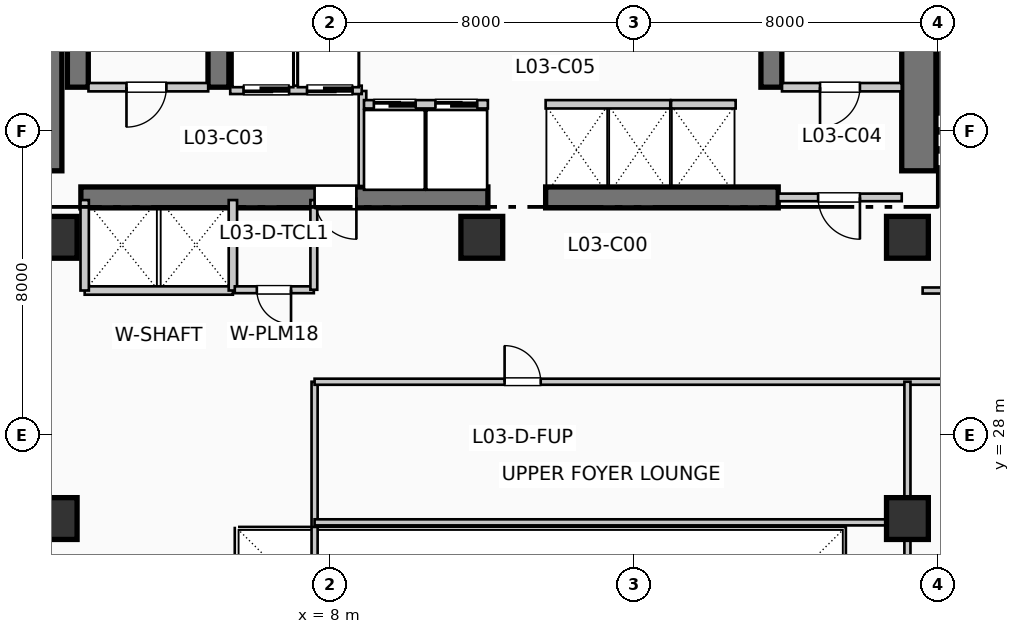
"""IFC4 building model, lengths in metres.
Left out: names, types, materials, properties, quantities, classifications, styles, units other than length and angle.
Written with IfcOpenShell. Run it as: python <this file> out.ifc"""

import sys

from ifc_helpers import new_model, si_unit, direction, frame, frame_2d, origin, origin_2d, place, context, subcontext, project, spatial, rectangle, extrude, element, fill, save


model = new_model("IFC4")
c1 = context("Model", 3, precision=1e-05, world=origin(), true_north=direction((0.0, 1.0)))
c2 = subcontext(c1, "Body", "Model", "MODEL_VIEW")
j1 = project(units=[si_unit("LENGTHUNIT", "METRE"), si_unit("PLANEANGLEUNIT", "RADIAN")], contexts=[c1])
p1 = place(None, origin())
s1 = spatial("IfcSite", under=j1, at=p1, CompositionType="ELEMENT")
p2 = place(p1, origin())
s2 = spatial("IfcBuilding", under=s1, at=p2, CompositionType="ELEMENT")
p3 = place(p2, frame((0.0, 0.0, 16.5)))
s3 = spatial("IfcBuildingStorey", under=s2, at=p3, CompositionType="ELEMENT", Elevation=16.5)
p4 = place(p3, frame((0.5, 34.95, 0.0), z_axis=(0.0, 0.0, 1.0), x_axis=(0.0, 1.0, 0.0)))
e1 = element("IfcWall", 1, at=p4, inside=s3, PredefinedType="SHEAR", context=c2, shape_type="SweptSolid", body=[
    extrude(rectangle(XDim=7.9, YDim=0.9, at=frame_2d((3.95, 0.0))), origin(), (0.0, 0.0, 1.0), 4.62),
])
p5 = place(p3, frame((23.5, 34.95, 0.0), z_axis=(0.0, 0.0, 1.0), x_axis=(0.0, 1.0, 0.0)))
e2 = element("IfcWall", 2, at=p5, inside=s3, PredefinedType="SHEAR", context=c2, shape_type="SweptSolid", body=[
    extrude(rectangle(XDim=10.64, YDim=0.9, at=frame_2d((5.32, 0.0))), origin(), (0.0, 0.0, 1.0), 4.62),
])
p6 = place(p3, frame((1.45, 34.25, 0.0), z_axis=(0.0, 0.0, 1.0), x_axis=(1.0, 0.0, 0.0)))
e3 = element("IfcWall", 3, at=p6, inside=s3, PredefinedType="SHEAR", context=c2, shape_type="SweptSolid", body=[
    extrude(rectangle(XDim=10.71, YDim=0.55, at=frame_2d((5.355, 0.0))), origin(), (0.0, 0.0, 1.0), 4.62),
])
p7 = place(p6, frame((7.25, 0.0, 0.0), z_axis=(0.0, 0.0, 1.0), x_axis=(-1.0, 0.0, 0.0)))
e4 = element("IfcOpeningElement", 4, at=p7, cuts=e3, PredefinedType="OPENING", context=c2, shape_type="SweptSolid", body=[
    extrude(rectangle(XDim=1.1, YDim=2.15, at=frame_2d((0.55, 1.075))), frame((0.0, 0.285, 0.0), z_axis=(0.0, -1.0, 0.0), x_axis=(1.0, 0.0, 0.0)), (0.0, 0.0, 1.0), 0.57),
])
p8 = place(p3, frame((13.68, 34.25, 0.0), z_axis=(0.0, 0.0, 1.0), x_axis=(1.0, 0.0, 0.0)))
e5 = element("IfcWall", 5, at=p8, inside=s3, PredefinedType="SHEAR", context=c2, shape_type="SweptSolid", body=[
    extrude(rectangle(XDim=6.12, YDim=0.55, at=frame_2d((3.06, 0.0))), origin(), (0.0, 0.0, 1.0), 4.62),
])
for number, where, z_axis, x_axis in (
    (6, (1.37, 37.15, 0.0), (0.0, 0.0, 1.0), (0.0, 1.0, 0.0)),
    (7, (5.07, 37.15, 0.0), (0.0, 0.0, 1.0), (0.0, 1.0, 0.0)),
    (8, (19.62, 37.15, 0.0), (0.0, 0.0, 1.0), (0.0, 1.0, 0.0)),
):
    element("IfcWall", number, at=place(p3, frame(where, z_axis=z_axis, x_axis=x_axis)), inside=s3, PredefinedType="SHEAR", context=c2, shape_type="SweptSolid", body=[
        extrude(rectangle(XDim=7.89, YDim=0.55, at=frame_2d((3.945, 0.0))), origin(), (0.0, 0.0, 1.0), 4.62),
    ])
for number, where, z_axis, x_axis in (
    (9, (0.8, 25.8, 0.0), (0.0, 0.0, 1.0), (1.0, 0.0, 0.0)),
    (10, (0.8, 33.2, 0.0), (0.0, 0.0, 1.0), (1.0, 0.0, 0.0)),
    (11, (12.0, 33.2, 0.0), (0.0, 0.0, 1.0), (1.0, 0.0, 0.0)),
    (12, (23.2, 25.8, 0.0), (0.0, 0.0, 1.0), (1.0, 0.0, 0.0)),
    (13, (23.2, 33.2, 0.0), (0.0, 0.0, 1.0), (1.0, 0.0, 0.0)),
):
    element("IfcColumn", number, at=place(p3, frame(where, z_axis=z_axis, x_axis=x_axis)), inside=s3, PredefinedType="COLUMN", context=c2, shape_type="SweptSolid", body=[
        extrude(rectangle(XDim=1.1, YDim=1.1, at=origin_2d()), origin(), (0.0, 0.0, 1.0), 4.62),
    ])
p9 = place(p3, frame((1.65, 37.15, 0.0), z_axis=(0.0, 0.0, 1.0), x_axis=(1.0, 0.0, 0.0)))
e14 = element("IfcWall", 14, at=p9, inside=s3, PredefinedType="PARTITIONING", context=c2, shape_type="SweptSolid", body=[
    extrude(rectangle(XDim=3.15, YDim=0.22, at=frame_2d((1.575, 0.0))), origin(), (0.0, 0.0, 1.0), 4.3),
])
p10 = place(p9, frame((2.05, 0.0, 0.0), z_axis=(0.0, 0.0, 1.0), x_axis=(-1.0, 0.0, 0.0)))
e15 = element("IfcOpeningElement", 15, at=p10, cuts=e14, PredefinedType="OPENING", context=c2, shape_type="SweptSolid", body=[
    extrude(rectangle(XDim=1.05, YDim=2.15, at=frame_2d((0.525, 1.075))), frame((0.0, 0.12, 0.0), z_axis=(0.0, -1.0, 0.0), x_axis=(1.0, 0.0, 0.0)), (0.0, 0.0, 1.0), 0.24),
])
p11 = place(p3, frame((8.86, 34.55, 0.0), z_axis=(0.0, 0.0, 1.0), x_axis=(0.0, 1.0, 0.0)))
e16 = element("IfcWall", 16, at=p11, inside=s3, PredefinedType="PARTITIONING", context=c2, shape_type="SweptSolid", body=[
    extrude(rectangle(XDim=2.5, YDim=0.2, at=frame_2d((1.25, 0.0))), origin(), (0.0, 0.0, 1.0), 4.3),
])
p12 = place(p3, frame((19.9, 37.15, 0.0), z_axis=(0.0, 0.0, 1.0), x_axis=(1.0, 0.0, 0.0)))
e17 = element("IfcWall", 17, at=p12, inside=s3, PredefinedType="PARTITIONING", context=c2, shape_type="SweptSolid", body=[
    extrude(rectangle(XDim=3.15, YDim=0.22, at=frame_2d((1.575, 0.0))), origin(), (0.0, 0.0, 1.0), 4.3),
])
p13 = place(p12, frame((2.05, 0.0, 0.0), z_axis=(0.0, 0.0, 1.0), x_axis=(-1.0, 0.0, 0.0)))
e18 = element("IfcOpeningElement", 18, at=p13, cuts=e17, PredefinedType="OPENING", context=c2, shape_type="SweptSolid", body=[
    extrude(rectangle(XDim=1.05, YDim=2.15, at=frame_2d((0.525, 1.075))), frame((0.0, 0.12, 0.0), z_axis=(0.0, -1.0, 0.0), x_axis=(1.0, 0.0, 0.0)), (0.0, 0.0, 1.0), 0.24),
])
p14 = place(p3, frame((19.8, 34.25, 0.0), z_axis=(0.0, 0.0, 1.0), x_axis=(1.0, 0.0, 0.0)))
e19 = element("IfcWall", 19, at=p14, inside=s3, PredefinedType="PARTITIONING", context=c2, shape_type="SweptSolid", body=[
    extrude(rectangle(XDim=3.25, YDim=0.2, at=frame_2d((1.625, 0.0))), origin(), (0.0, 0.0, 1.0), 4.3),
])
p15 = place(p14, frame((2.15, 0.0, 0.0), z_axis=(0.0, 0.0, 1.0), x_axis=(-1.0, 0.0, 0.0)))
e20 = element("IfcOpeningElement", 20, at=p15, cuts=e19, PredefinedType="OPENING", context=c2, shape_type="SweptSolid", body=[
    extrude(rectangle(XDim=1.1, YDim=2.15, at=frame_2d((0.55, 1.075))), frame((0.0, 0.11, 0.0), z_axis=(0.0, -1.0, 0.0), x_axis=(1.0, 0.0, 0.0)), (0.0, 0.0, 1.0), 0.22),
])
p16 = place(p3, frame((5.38, 37.08, 0.0), z_axis=(0.0, 0.0, 1.0), x_axis=(1.0, 0.0, 0.0)))
e21 = element("IfcWall", 21, at=p16, inside=s3, PredefinedType="PARTITIONING", context=c2, shape_type="SweptSolid", body=[
    extrude(rectangle(XDim=3.46, YDim=0.22, at=frame_2d((1.73, 0.0))), origin(), (0.0, 0.0, 1.0), 4.3),
])
p17 = place(p16, frame((1.55, 0.0, 0.0), z_axis=(0.0, 0.0, 1.0), x_axis=(-1.0, 0.0, 0.0)))
e22 = element("IfcOpeningElement", 22, at=p17, cuts=e21, PredefinedType="OPENING", context=c2, shape_type="SweptSolid", body=[
    extrude(rectangle(XDim=1.2, YDim=2.2, at=frame_2d((0.6, 1.1))), frame((0.0, 0.12, 0.0), z_axis=(0.0, -1.0, 0.0), x_axis=(1.0, 0.0, 0.0)), (0.0, 0.0, 1.0), 0.24),
])
p18 = place(p16, frame((3.22, 0.0, 0.0), z_axis=(0.0, 0.0, 1.0), x_axis=(-1.0, 0.0, 0.0)))
e23 = element("IfcOpeningElement", 23, at=p18, cuts=e21, PredefinedType="OPENING", context=c2, shape_type="SweptSolid", body=[
    extrude(rectangle(XDim=1.2, YDim=2.2, at=frame_2d((0.6, 1.1))), frame((0.0, 0.12, 0.0), z_axis=(0.0, -1.0, 0.0), x_axis=(1.0, 0.0, 0.0)), (0.0, 0.0, 1.0), 0.24),
])
p19 = place(p3, frame((1.55, 31.8, 0.0), z_axis=(0.0, 0.0, 1.0), x_axis=(1.0, 0.0, 0.0)))
e24 = element("IfcWall", 24, at=p19, inside=s3, PredefinedType="PARTITIONING", context=c2, shape_type="SweptSolid", body=[
    extrude(rectangle(XDim=3.9, YDim=0.22, at=frame_2d((1.95, 0.0))), origin(), (0.0, 0.0, 1.0), 4.3),
])
for number, where, z_axis, x_axis in (
    (25, (1.55, 31.8, 0.0), (0.0, 0.0, 1.0), (0.0, 1.0, 0.0)),
    (26, (5.45, 31.8, 0.0), (0.0, 0.0, 1.0), (0.0, 1.0, 0.0)),
):
    element("IfcWall", number, at=place(p3, frame(where, z_axis=z_axis, x_axis=x_axis)), inside=s3, PredefinedType="PARTITIONING", context=c2, shape_type="SweptSolid", body=[
        extrude(rectangle(XDim=2.38, YDim=0.22, at=frame_2d((1.19, 0.0))), origin(), (0.0, 0.0, 1.0), 4.3),
    ])
p20 = place(p3, frame((5.5, 31.82, 0.0), z_axis=(0.0, 0.0, 1.0), x_axis=(1.0, 0.0, 0.0)))
e27 = element("IfcWall", 27, at=p20, inside=s3, PredefinedType="PLUMBINGWALL", context=c2, shape_type="SweptSolid", body=[
    extrude(rectangle(XDim=2.08, YDim=0.18, at=frame_2d((1.04, 0.0))), origin(), (0.0, 0.0, 1.0), 4.3),
])
p21 = place(p20, frame((1.48, 0.0, 0.0), z_axis=(0.0, 0.0, 1.0), x_axis=(-1.0, 0.0, 0.0)))
e28 = element("IfcOpeningElement", 28, at=p21, cuts=e27, PredefinedType="OPENING", context=c2, shape_type="SweptSolid", body=[
    extrude(rectangle(XDim=0.9, YDim=2.1, at=frame_2d((0.45, 1.05))), frame((0.0, 0.1, 0.0), z_axis=(0.0, -1.0, 0.0), x_axis=(1.0, 0.0, 0.0)), (0.0, 0.0, 1.0), 0.2),
])
p22 = place(p3, frame((7.58, 31.82, 0.0), z_axis=(0.0, 0.0, 1.0), x_axis=(0.0, 1.0, 0.0)))
e29 = element("IfcWall", 29, at=p22, inside=s3, PredefinedType="PLUMBINGWALL", context=c2, shape_type="SweptSolid", body=[
    extrude(rectangle(XDim=2.36, YDim=0.18, at=frame_2d((1.18, 0.0))), origin(), (0.0, 0.0, 1.0), 4.3),
])
p23 = place(p3, frame((8.9, 36.7, 0.0), z_axis=(0.0, 0.0, 1.0), x_axis=(1.0, 0.0, 0.0)))
e30 = element("IfcWall", 30, at=p23, inside=s3, PredefinedType="PARTITIONING", context=c2, shape_type="SweptSolid", body=[
    extrude(rectangle(XDim=3.26, YDim=0.22, at=frame_2d((1.63, 0.0))), origin(), (0.0, 0.0, 1.0), 4.3),
])
p24 = place(p23, frame((0.26, 0.0, 0.0)))
e31 = element("IfcOpeningElement", 31, at=p24, cuts=e30, PredefinedType="OPENING", context=c2, shape_type="SweptSolid", body=[
    extrude(rectangle(XDim=1.1, YDim=2.2, at=frame_2d((0.55, 1.1))), frame((0.0, 0.12, 0.0), z_axis=(0.0, -1.0, 0.0), x_axis=(1.0, 0.0, 0.0)), (0.0, 0.0, 1.0), 0.24),
])
p25 = place(p23, frame((1.88, 0.0, 0.0)))
e32 = element("IfcOpeningElement", 32, at=p25, cuts=e30, PredefinedType="OPENING", context=c2, shape_type="SweptSolid", body=[
    extrude(rectangle(XDim=1.1, YDim=2.2, at=frame_2d((0.55, 1.1))), frame((0.0, 0.12, 0.0), z_axis=(0.0, -1.0, 0.0), x_axis=(1.0, 0.0, 0.0)), (0.0, 0.0, 1.0), 0.24),
])
p26 = place(p3, frame((13.68, 36.7, 0.0), z_axis=(0.0, 0.0, 1.0), x_axis=(1.0, 0.0, 0.0)))
e33 = element("IfcWall", 33, at=p26, inside=s3, PredefinedType="PARTITIONING", context=c2, shape_type="SweptSolid", body=[
    extrude(rectangle(XDim=3.28, YDim=0.22, at=frame_2d((1.64, 0.0))), origin(), (0.0, 0.0, 1.0), 4.3),
])
p27 = place(p3, frame((16.98, 36.7, 0.0), z_axis=(0.0, 0.0, 1.0), x_axis=(1.0, 0.0, 0.0)))
e34 = element("IfcWall", 34, at=p27, inside=s3, PredefinedType="PARTITIONING", context=c2, shape_type="SweptSolid", body=[
    extrude(rectangle(XDim=1.7, YDim=0.22, at=frame_2d((0.85, 0.0))), origin(), (0.0, 0.0, 1.0), 4.3),
])
p28 = place(p3, frame((7.6, -1.81, 0.0), z_axis=(0.0, 0.0, 1.0), x_axis=(0.0, 1.0, 0.0)))
e35 = element("IfcWall", 35, at=p28, inside=s3, PredefinedType="PARTITIONING", context=c2, shape_type="SweptSolid", body=[
    extrude(rectangle(XDim=31.21, YDim=0.16, at=frame_2d((15.605, 0.0))), origin(), (0.0, 0.0, 1.0), 3.385),
])
p29 = place(p28, frame((3.8, 0.0, 0.0)))
e36 = element("IfcOpeningElement", 36, at=p29, cuts=e35, PredefinedType="OPENING", context=c2, shape_type="SweptSolid", body=[
    extrude(rectangle(XDim=1.8, YDim=2.3, at=frame_2d((0.9, 1.15))), frame((0.0, 0.09, 0.0), z_axis=(0.0, -1.0, 0.0), x_axis=(1.0, 0.0, 0.0)), (0.0, 0.0, 1.0), 0.18),
])
p30 = place(p3, frame((7.6, 29.4, 0.0), z_axis=(0.0, 0.0, 1.0), x_axis=(1.0, 0.0, 0.0)))
e37 = element("IfcWall", 37, at=p30, inside=s3, PredefinedType="PARTITIONING", context=c2, shape_type="SweptSolid", body=[
    extrude(rectangle(XDim=43.75, YDim=0.16, at=frame_2d((21.875, 0.0))), origin(), (0.0, 0.0, 1.0), 3.955),
])
p31 = place(p30, frame((5.0, 0.0, 0.0)))
e38 = element("IfcOpeningElement", 38, at=p31, cuts=e37, PredefinedType="OPENING", context=c2, shape_type="SweptSolid", body=[
    extrude(rectangle(XDim=0.95, YDim=2.15, at=frame_2d((0.475, 1.075))), frame((0.0, 0.09, 0.0), z_axis=(0.0, -1.0, 0.0), x_axis=(1.0, 0.0, 0.0)), (0.0, 0.0, 1.0), 0.18),
])
p32 = place(p30, frame((18.0, 0.0, 0.0)))
e39 = element("IfcOpeningElement", 39, at=p32, cuts=e37, PredefinedType="OPENING", context=c2, shape_type="SweptSolid", body=[
    extrude(rectangle(XDim=0.95, YDim=2.15, at=frame_2d((0.475, 1.075))), frame((0.0, 0.09, 0.0), z_axis=(0.0, -1.0, 0.0), x_axis=(1.0, 0.0, 0.0)), (0.0, 0.0, 1.0), 0.18),
])
p33 = place(p30, frame((26.5, 0.0, 0.0)))
e40 = element("IfcOpeningElement", 40, at=p33, cuts=e37, PredefinedType="OPENING", context=c2, shape_type="SweptSolid", body=[
    extrude(rectangle(XDim=0.95, YDim=2.15, at=frame_2d((0.475, 1.075))), frame((0.0, 0.09, 0.0), z_axis=(0.0, -1.0, 0.0), x_axis=(1.0, 0.0, 0.0)), (0.0, 0.0, 1.0), 0.18),
])
p34 = place(p30, frame((35.0, 0.0, 0.0)))
e41 = element("IfcOpeningElement", 41, at=p34, cuts=e37, PredefinedType="OPENING", context=c2, shape_type="SweptSolid", body=[
    extrude(rectangle(XDim=0.95, YDim=2.15, at=frame_2d((0.475, 1.075))), frame((0.0, 0.09, 0.0), z_axis=(0.0, -1.0, 0.0), x_axis=(1.0, 0.0, 0.0)), (0.0, 0.0, 1.0), 0.18),
])
p35 = place(p3, frame((7.6, 25.7, 0.0), z_axis=(0.0, 0.0, 1.0), x_axis=(1.0, 0.0, 0.0)))
e42 = element("IfcWall", 42, at=p35, inside=s3, PredefinedType="PARTITIONING", context=c2, shape_type="SweptSolid", body=[
    extrude(rectangle(XDim=15.6, YDim=0.16, at=frame_2d((7.8, 0.0))), origin(), (0.0, 0.0, 1.0), 3.485),
])
p36 = place(p3, frame((23.2, -1.81, 0.0), z_axis=(0.0, 0.0, 1.0), x_axis=(0.0, 1.0, 0.0)))
e43 = element("IfcWall", 43, at=p36, inside=s3, PredefinedType="PARTITIONING", context=c2, shape_type="SweptSolid", body=[
    extrude(rectangle(XDim=31.21, YDim=0.16, at=frame_2d((15.605, 0.0))), origin(), (0.0, 0.0, 1.0), 3.485),
])
p37 = place(p3, frame((23.6, 31.8, 0.0), z_axis=(0.0, 0.0, 1.0), x_axis=(1.0, 0.0, 0.0)))
e44 = element("IfcWall", 44, at=p37, inside=s3, PredefinedType="PARTITIONING", context=c2, shape_type="SweptSolid", body=[
    extrude(rectangle(XDim=42.21, YDim=0.16, at=frame_2d((21.105, 0.0))), origin(), (0.0, 0.0, 1.0), 4.3),
])
p38 = place(p37, frame((3.0, 0.0, 0.0)))
e45 = element("IfcOpeningElement", 45, at=p38, cuts=e44, PredefinedType="OPENING", context=c2, shape_type="SweptSolid", body=[
    extrude(rectangle(XDim=1.8, YDim=2.3, at=frame_2d((0.9, 1.15))), frame((0.0, 0.09, 0.0), z_axis=(0.0, -1.0, 0.0), x_axis=(1.0, 0.0, 0.0)), (0.0, 0.0, 1.0), 0.18),
])
p39 = place(p37, frame((10.0, 0.0, 0.0)))
e46 = element("IfcOpeningElement", 46, at=p39, cuts=e44, PredefinedType="OPENING", context=c2, shape_type="SweptSolid", body=[
    extrude(rectangle(XDim=0.95, YDim=2.15, at=frame_2d((0.475, 1.075))), frame((0.0, 0.09, 0.0), z_axis=(0.0, -1.0, 0.0), x_axis=(1.0, 0.0, 0.0)), (0.0, 0.0, 1.0), 0.18),
])
p40 = place(p37, frame((29.0, 0.0, 0.0)))
e47 = element("IfcOpeningElement", 47, at=p40, cuts=e44, PredefinedType="OPENING", context=c2, shape_type="SweptSolid", body=[
    extrude(rectangle(XDim=0.95, YDim=2.15, at=frame_2d((0.475, 1.075))), frame((0.0, 0.09, 0.0), z_axis=(0.0, -1.0, 0.0), x_axis=(1.0, 0.0, 0.0)), (0.0, 0.0, 1.0), 0.18),
])
p41 = place(p10, origin())
e48 = element("IfcDoor", 48, at=p41, inside=s3, OperationType="SINGLE_SWING_LEFT", PredefinedType="DOOR", context=c2, shape_type="SweptSolid", body=[
    extrude(rectangle(XDim=1.05, YDim=2.15, at=frame_2d((0.525, 1.075))), frame((0.0, 0.025, 0.0), z_axis=(0.0, -1.0, 0.0), x_axis=(1.0, 0.0, 0.0)), (0.0, 0.0, 1.0), 0.05),
])
fill(e15, e48)
p42 = place(p7, origin())
e49 = element("IfcDoor", 49, at=p42, inside=s3, OperationType="SINGLE_SWING_RIGHT", PredefinedType="DOOR", context=c2, shape_type="SweptSolid", body=[
    extrude(rectangle(XDim=1.1, YDim=2.15, at=frame_2d((0.55, 1.075))), frame((0.0, 0.025, 0.0), z_axis=(0.0, -1.0, 0.0), x_axis=(1.0, 0.0, 0.0)), (0.0, 0.0, 1.0), 0.05),
])
fill(e4, e49)
p43 = place(p13, origin())
e50 = element("IfcDoor", 50, at=p43, inside=s3, OperationType="SINGLE_SWING_LEFT", PredefinedType="DOOR", context=c2, shape_type="SweptSolid", body=[
    extrude(rectangle(XDim=1.05, YDim=2.15, at=frame_2d((0.525, 1.075))), frame((0.0, 0.025, 0.0), z_axis=(0.0, -1.0, 0.0), x_axis=(1.0, 0.0, 0.0)), (0.0, 0.0, 1.0), 0.05),
])
fill(e18, e50)
p44 = place(p15, origin())
e51 = element("IfcDoor", 51, at=p44, inside=s3, OperationType="SINGLE_SWING_RIGHT", PredefinedType="DOOR", context=c2, shape_type="SweptSolid", body=[
    extrude(rectangle(XDim=1.1, YDim=2.15, at=frame_2d((0.55, 1.075))), frame((0.0, 0.025, 0.0), z_axis=(0.0, -1.0, 0.0), x_axis=(1.0, 0.0, 0.0)), (0.0, 0.0, 1.0), 0.05),
])
fill(e20, e51)
p45 = place(p17, origin())
e52 = element("IfcDoor", 52, at=p45, inside=s3, OperationType="SLIDING_TO_RIGHT", PredefinedType="DOOR", context=c2, shape_type="SweptSolid", body=[
    extrude(rectangle(XDim=1.2, YDim=2.2, at=frame_2d((0.6, 1.1))), frame((0.0, 0.025, 0.0), z_axis=(0.0, -1.0, 0.0), x_axis=(1.0, 0.0, 0.0)), (0.0, 0.0, 1.0), 0.05),
])
fill(e22, e52)
p46 = place(p18, origin())
e53 = element("IfcDoor", 53, at=p46, inside=s3, OperationType="SLIDING_TO_RIGHT", PredefinedType="DOOR", context=c2, shape_type="SweptSolid", body=[
    extrude(rectangle(XDim=1.2, YDim=2.2, at=frame_2d((0.6, 1.1))), frame((0.0, 0.025, 0.0), z_axis=(0.0, -1.0, 0.0), x_axis=(1.0, 0.0, 0.0)), (0.0, 0.0, 1.0), 0.05),
])
fill(e23, e53)
p47 = place(p21, origin())
e54 = element("IfcDoor", 54, at=p47, inside=s3, OperationType="SINGLE_SWING_RIGHT", PredefinedType="DOOR", context=c2, shape_type="SweptSolid", body=[
    extrude(rectangle(XDim=0.9, YDim=2.1, at=frame_2d((0.45, 1.05))), frame((0.0, 0.025, 0.0), z_axis=(0.0, -1.0, 0.0), x_axis=(1.0, 0.0, 0.0)), (0.0, 0.0, 1.0), 0.05),
])
fill(e28, e54)
p48 = place(p24, origin())
e55 = element("IfcDoor", 55, at=p48, inside=s3, OperationType="SLIDING_TO_LEFT", PredefinedType="DOOR", context=c2, shape_type="SweptSolid", body=[
    extrude(rectangle(XDim=1.1, YDim=2.2, at=frame_2d((0.55, 1.1))), frame((0.0, 0.025, 0.0), z_axis=(0.0, -1.0, 0.0), x_axis=(1.0, 0.0, 0.0)), (0.0, 0.0, 1.0), 0.05),
])
fill(e31, e55)
p49 = place(p25, origin())
e56 = element("IfcDoor", 56, at=p49, inside=s3, OperationType="SLIDING_TO_LEFT", PredefinedType="DOOR", context=c2, shape_type="SweptSolid", body=[
    extrude(rectangle(XDim=1.1, YDim=2.2, at=frame_2d((0.55, 1.1))), frame((0.0, 0.025, 0.0), z_axis=(0.0, -1.0, 0.0), x_axis=(1.0, 0.0, 0.0)), (0.0, 0.0, 1.0), 0.05),
])
fill(e32, e56)
p50 = place(p31, origin())
e57 = element("IfcDoor", 57, at=p50, inside=s3, OperationType="SINGLE_SWING_LEFT", PredefinedType="DOOR", context=c2, shape_type="SweptSolid", body=[
    extrude(rectangle(XDim=0.95, YDim=2.15, at=frame_2d((0.475, 1.075))), frame((0.0, 0.025, 0.0), z_axis=(0.0, -1.0, 0.0), x_axis=(1.0, 0.0, 0.0)), (0.0, 0.0, 1.0), 0.05),
])
fill(e38, e57)
save(model, sys.argv[1])
